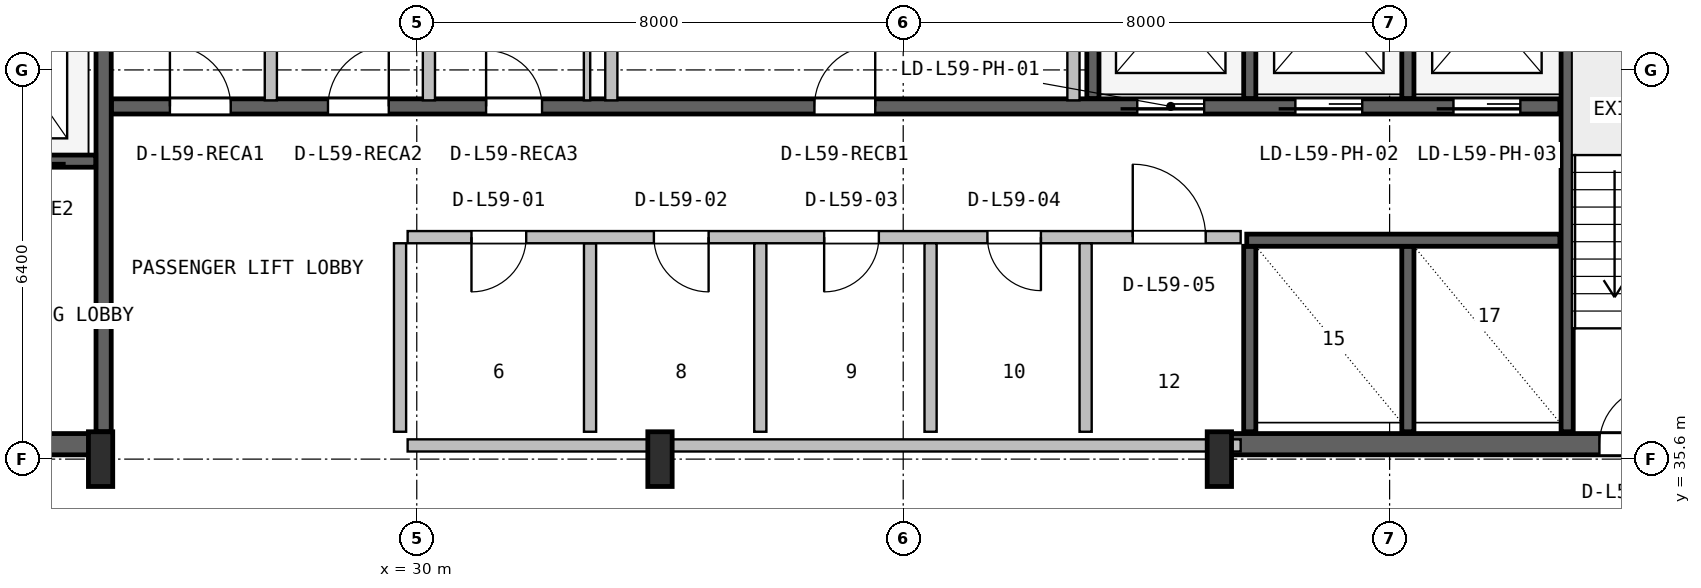
"""IFC4 building model, lengths in metres.
Left out: names, types, materials, properties, quantities, classifications, styles, units other than length and angle.
Written with IfcOpenShell. Run it as: python <this file> out.ifc"""

import sys

from ifc_helpers import new_model, si_unit, direction, frame, frame_2d, origin, origin_2d, place, context, subcontext, project, spatial, rectangle, i_section, extrude, source, transform, mapped, element, fill, save


model = new_model("IFC4")
c1 = context("Model", 3, precision=1e-05, world=origin(), true_north=direction((0.0, 1.0)))
c2 = subcontext(c1, "Body", "Model", "MODEL_VIEW")
j1 = project(units=[si_unit("LENGTHUNIT", "METRE"), si_unit("PLANEANGLEUNIT", "RADIAN")], contexts=[c1])
p1 = place(None, origin())
s1 = spatial("IfcSite", under=j1, at=p1, CompositionType="ELEMENT")
p2 = place(p1, origin())
s2 = spatial("IfcBuilding", under=s1, at=p2, CompositionType="ELEMENT")
p3 = place(p2, frame((0.0, 0.0, 239.4)))
s3 = spatial("IfcBuildingStorey", under=s2, at=p3, CompositionType="ELEMENT", Elevation=239.4)
p4 = place(p3, frame((15.67, 35.845, 0.0), z_axis=(0.0, 0.0, 1.0), x_axis=(1.0, 0.0, 0.0)))
e1 = element("IfcWall", 1, at=p4, inside=s3, PredefinedType="SHEAR", context=c2, shape_type="SweptSolid", body=[
    extrude(rectangle(XDim=9.13, YDim=0.35, at=frame_2d((4.565, 0.0))), origin(), (0.0, 0.0, 1.0), 3.55),
])
p5 = place(p4, frame((5.4, 0.0, 0.0)))
e2 = element("IfcOpeningElement", 2, at=p5, cuts=e1, PredefinedType="OPENING", context=c2, shape_type="SweptSolid", body=[
    extrude(rectangle(XDim=1.0, YDim=2.1, at=frame_2d((0.5, 1.05))), frame((0.0, 0.185, 0.0), z_axis=(0.0, -1.0, 0.0), x_axis=(1.0, 0.0, 0.0)), (0.0, 0.0, 1.0), 0.37),
])
p6 = place(p3, frame((43.2, 35.845, 0.0), z_axis=(0.0, 0.0, 1.0), x_axis=(1.0, 0.0, 0.0)))
e3 = element("IfcWall", 3, at=p6, inside=s3, PredefinedType="SHEAR", context=c2, shape_type="SweptSolid", body=[
    extrude(rectangle(XDim=9.13, YDim=0.35, at=frame_2d((4.565, 0.0))), origin(), (0.0, 0.0, 1.0), 3.55),
])
p7 = place(p6, frame((6.25, 0.0, 0.0)))
e4 = element("IfcOpeningElement", 4, at=p7, cuts=e3, PredefinedType="OPENING", context=c2, shape_type="SweptSolid", body=[
    extrude(rectangle(XDim=0.95, YDim=2.1, at=frame_2d((0.475, 1.05))), frame((0.0, 0.185, 0.0), z_axis=(0.0, -1.0, 0.0), x_axis=(1.0, 0.0, 0.0)), (0.0, 0.0, 1.0), 0.37),
])
m1 = source(origin(), c2, "Body", "SweptSolid", [
    extrude(i_section(OverallWidth=0.4, OverallDepth=0.9, WebThickness=0.016, FlangeThickness=0.028, FilletRadius=0.016, at=origin_2d()), origin(), (0.0, 0.0, 1.0), 3.8),
])
for number, where, z_axis, x_axis in (
    (5, (24.8, 35.6, 0.0), (0.0, 0.0, 1.0), (1.0, 0.0, 0.0)),
    (6, (34.0, 35.6, 0.0), (0.0, 0.0, 1.0), (1.0, 0.0, 0.0)),
    (7, (43.2, 35.6, 0.0), (0.0, 0.0, 1.0), (1.0, 0.0, 0.0)),
):
    element("IfcColumn", number, at=place(p3, frame(where, z_axis=z_axis, x_axis=x_axis)), inside=s3, PredefinedType="COLUMN", context=c2, shape_type="MappedRepresentation", body=[
        mapped(m1, transform((0.0, 0.0, 0.0), x_axis=(1.0, 0.0, 0.0), y_axis=(0.0, 1.0, 0.0), z_axis=(0.0, 0.0, 1.0), scale=1.0)),
    ])
p8 = place(p3, frame((24.85, 36.05, 0.0), z_axis=(0.0, 0.0, 1.0), x_axis=(0.0, 1.0, 0.0)))
e8 = element("IfcWall", 8, at=p8, inside=s3, PredefinedType="SHEAR", context=c2, shape_type="SweptSolid", body=[
    extrude(rectangle(XDim=10.45, YDim=0.25, at=frame_2d((5.225, 0.0))), origin(), (0.0, 0.0, 1.0), 3.55),
])
p9 = place(p3, frame((19.2, 40.5, 0.0), z_axis=(0.0, 0.0, 1.0), x_axis=(1.0, 0.0, 0.0)))
e9 = element("IfcWall", 9, at=p9, inside=s3, PredefinedType="SHEAR", context=c2, shape_type="SweptSolid", body=[
    extrude(rectangle(XDim=5.52, YDim=0.2, at=frame_2d((2.76, 0.0))), origin(), (0.0, 0.0, 1.0), 3.55),
])
p10 = place(p9, frame((1.05, 0.0, 0.0)))
e10 = element("IfcOpeningElement", 10, at=p10, cuts=e9, PredefinedType="OPENING", context=c2, shape_type="SweptSolid", body=[
    extrude(rectangle(XDim=1.1, YDim=2.18, at=frame_2d((0.55, 1.09))), frame((0.0, 0.11, 0.0), z_axis=(0.0, -1.0, 0.0), x_axis=(1.0, 0.0, 0.0)), (0.0, 0.0, 1.0), 0.22),
])
p11 = place(p9, frame((3.65, 0.0, 0.0)))
e11 = element("IfcOpeningElement", 11, at=p11, cuts=e9, PredefinedType="OPENING", context=c2, shape_type="SweptSolid", body=[
    extrude(rectangle(XDim=1.1, YDim=2.18, at=frame_2d((0.55, 1.09))), frame((0.0, 0.11, 0.0), z_axis=(0.0, -1.0, 0.0), x_axis=(1.0, 0.0, 0.0)), (0.0, 0.0, 1.0), 0.22),
])
p12 = place(p3, frame((48.92, 36.05, 0.0), z_axis=(0.0, 0.0, 1.0), x_axis=(0.0, 1.0, 0.0)))
e12 = element("IfcWall", 12, at=p12, inside=s3, PredefinedType="SHEAR", context=c2, shape_type="SweptSolid", body=[
    extrude(rectangle(XDim=10.5, YDim=0.2, at=frame_2d((5.25, 0.0))), origin(), (0.0, 0.0, 1.0), 3.55),
])
p13 = place(p3, frame((24.98, 41.4, 0.0), z_axis=(0.0, 0.0, 1.0), x_axis=(1.0, 0.0, 0.0)))
e13 = element("IfcWall", 13, at=p13, inside=s3, PredefinedType="SHEAR", context=c2, shape_type="SweptSolid", body=[
    extrude(rectangle(XDim=23.82, YDim=0.25, at=frame_2d((11.91, 0.0))), origin(), (0.0, 0.0, 1.0), 3.55),
])
p14 = place(p13, frame((16.87, 0.0, 0.0)))
e14 = element("IfcOpeningElement", 14, at=p14, cuts=e13, PredefinedType="OPENING", context=c2, shape_type="SweptSolid", body=[
    extrude(rectangle(XDim=1.1, YDim=2.18, at=frame_2d((0.55, 1.09))), frame((0.0, 0.135, 0.0), z_axis=(0.0, -1.0, 0.0), x_axis=(1.0, 0.0, 0.0)), (0.0, 0.0, 1.0), 0.27),
])
p15 = place(p13, frame((19.47, 0.0, 0.0)))
e15 = element("IfcOpeningElement", 15, at=p15, cuts=e13, PredefinedType="OPENING", context=c2, shape_type="SweptSolid", body=[
    extrude(rectangle(XDim=1.1, YDim=2.18, at=frame_2d((0.55, 1.09))), frame((0.0, 0.135, 0.0), z_axis=(0.0, -1.0, 0.0), x_axis=(1.0, 0.0, 0.0)), (0.0, 0.0, 1.0), 0.27),
])
p16 = place(p13, frame((22.07, 0.0, 0.0)))
e16 = element("IfcOpeningElement", 16, at=p16, cuts=e13, PredefinedType="OPENING", context=c2, shape_type="SweptSolid", body=[
    extrude(rectangle(XDim=1.1, YDim=2.18, at=frame_2d((0.55, 1.09))), frame((0.0, 0.135, 0.0), z_axis=(0.0, -1.0, 0.0), x_axis=(1.0, 0.0, 0.0)), (0.0, 0.0, 1.0), 0.27),
])
p17 = place(p13, frame((0.96, 0.0, 0.0)))
e17 = element("IfcOpeningElement", 17, at=p17, cuts=e13, PredefinedType="OPENING", context=c2, shape_type="SweptSolid", body=[
    extrude(rectangle(XDim=1.0, YDim=2.08, at=frame_2d((0.5, 1.04))), frame((0.0, 0.135, 0.0), z_axis=(0.0, -1.0, 0.0), x_axis=(1.0, 0.0, 0.0)), (0.0, 0.0, 1.0), 0.27),
])
p18 = place(p13, frame((3.56, 0.0, 0.0)))
e18 = element("IfcOpeningElement", 18, at=p18, cuts=e13, PredefinedType="OPENING", context=c2, shape_type="SweptSolid", body=[
    extrude(rectangle(XDim=1.0, YDim=2.08, at=frame_2d((0.5, 1.04))), frame((0.0, 0.135, 0.0), z_axis=(0.0, -1.0, 0.0), x_axis=(1.0, 0.0, 0.0)), (0.0, 0.0, 1.0), 0.27),
])
p19 = place(p13, frame((6.16, 0.0, 0.0)))
e19 = element("IfcOpeningElement", 19, at=p19, cuts=e13, PredefinedType="OPENING", context=c2, shape_type="SweptSolid", body=[
    extrude(rectangle(XDim=0.92, YDim=2.08, at=frame_2d((0.46, 1.04))), frame((0.0, 0.135, 0.0), z_axis=(0.0, -1.0, 0.0), x_axis=(1.0, 0.0, 0.0)), (0.0, 0.0, 1.0), 0.27),
])
p20 = place(p13, frame((11.56, 0.0, 0.0)))
e20 = element("IfcOpeningElement", 20, at=p20, cuts=e13, PredefinedType="OPENING", context=c2, shape_type="SweptSolid", body=[
    extrude(rectangle(XDim=1.0, YDim=2.08, at=frame_2d((0.5, 1.04))), frame((0.0, 0.135, 0.0), z_axis=(0.0, -1.0, 0.0), x_axis=(1.0, 0.0, 0.0)), (0.0, 0.0, 1.0), 0.27),
])
p21 = place(p3, frame((41.12, 41.53, 0.0), z_axis=(0.0, 0.0, 1.0), x_axis=(0.0, 1.0, 0.0)))
e21 = element("IfcWall", 21, at=p21, inside=s3, PredefinedType="SHEAR", context=c2, shape_type="SweptSolid", body=[
    extrude(rectangle(XDim=5.02, YDim=0.2, at=frame_2d((2.51, 0.0))), origin(), (0.0, 0.0, 1.0), 3.55),
])
for number, where, z_axis, x_axis in (
    (22, (43.7, 41.53, 0.0), (0.0, 0.0, 1.0), (0.0, 1.0, 0.0)),
    (23, (46.3, 41.53, 0.0), (0.0, 0.0, 1.0), (0.0, 1.0, 0.0)),
):
    element("IfcWall", number, at=place(p3, frame(where, z_axis=z_axis, x_axis=x_axis)), inside=s3, PredefinedType="SHEAR", context=c2, shape_type="SweptSolid", body=[
        extrude(rectangle(XDim=2.87, YDim=0.2, at=frame_2d((1.435, 0.0))), origin(), (0.0, 0.0, 1.0), 3.55),
    ])
for number, where, z_axis, x_axis in (
    (24, (43.7, 36.05, 0.0), (0.0, 0.0, 1.0), (0.0, 1.0, 0.0)),
    (25, (46.3, 36.05, 0.0), (0.0, 0.0, 1.0), (0.0, 1.0, 0.0)),
):
    element("IfcWall", number, at=place(p3, frame(where, z_axis=z_axis, x_axis=x_axis)), inside=s3, PredefinedType="SHEAR", context=c2, shape_type="SweptSolid", body=[
        extrude(rectangle(XDim=3.05, YDim=0.2, at=frame_2d((1.525, 0.0))), origin(), (0.0, 0.0, 1.0), 3.55),
    ])
p22 = place(p3, frame((43.65, 39.2, 0.0), z_axis=(0.0, 0.0, 1.0), x_axis=(1.0, 0.0, 0.0)))
e26 = element("IfcWall", 26, at=p22, inside=s3, PredefinedType="SHEAR", context=c2, shape_type="SweptSolid", body=[
    extrude(rectangle(XDim=5.15, YDim=0.2, at=frame_2d((2.575, 0.0))), origin(), (0.0, 0.0, 1.0), 3.55),
])
p23 = place(p3, frame((29.85, 35.825, 0.0), z_axis=(0.0, 0.0, 1.0), x_axis=(1.0, 0.0, 0.0)))
e27 = element("IfcWall", 27, at=p23, inside=s3, PredefinedType="SOLIDWALL", context=c2, shape_type="SweptSolid", body=[
    extrude(rectangle(XDim=13.7, YDim=0.2, at=frame_2d((6.85, 0.0))), origin(), (0.0, 0.0, 1.0), 2.575),
])
p24 = place(p3, frame((32.85, 36.05, 0.0), z_axis=(0.0, 0.0, 1.0), x_axis=(0.0, 1.0, 0.0)))
e28 = element("IfcWall", 28, at=p24, inside=s3, PredefinedType="PLUMBINGWALL", context=c2, shape_type="SweptSolid", body=[
    extrude(rectangle(XDim=3.1, YDim=0.2, at=frame_2d((1.55, 0.0))), origin(), (0.0, 0.0, 1.0), 3.53),
])
p25 = place(p3, frame((29.85, 39.25, 0.0), z_axis=(0.0, 0.0, 1.0), x_axis=(1.0, 0.0, 0.0)))
e29 = element("IfcWall", 29, at=p25, inside=s3, PredefinedType="SOLIDWALL", context=c2, shape_type="SweptSolid", body=[
    extrude(rectangle(XDim=13.7, YDim=0.2, at=frame_2d((6.85, 0.0))), origin(), (0.0, 0.0, 1.0), 3.53),
])
p26 = place(p25, frame((1.05, 0.0, 0.0)))
e30 = element("IfcOpeningElement", 30, at=p26, cuts=e29, PredefinedType="OPENING", context=c2, shape_type="SweptSolid", body=[
    extrude(rectangle(XDim=0.9, YDim=2.06, at=frame_2d((0.45, 1.03))), frame((0.0, 0.11, 0.0), z_axis=(0.0, -1.0, 0.0), x_axis=(1.0, 0.0, 0.0)), (0.0, 0.0, 1.0), 0.22),
])
p27 = place(p25, frame((4.05, 0.0, 0.0)))
e31 = element("IfcOpeningElement", 31, at=p27, cuts=e29, PredefinedType="OPENING", context=c2, shape_type="SweptSolid", body=[
    extrude(rectangle(XDim=0.9, YDim=2.06, at=frame_2d((0.45, 1.03))), frame((0.0, 0.11, 0.0), z_axis=(0.0, -1.0, 0.0), x_axis=(1.0, 0.0, 0.0)), (0.0, 0.0, 1.0), 0.22),
])
p28 = place(p25, frame((6.85, 0.0, 0.0)))
e32 = element("IfcOpeningElement", 32, at=p28, cuts=e29, PredefinedType="OPENING", context=c2, shape_type="SweptSolid", body=[
    extrude(rectangle(XDim=0.9, YDim=2.06, at=frame_2d((0.45, 1.03))), frame((0.0, 0.11, 0.0), z_axis=(0.0, -1.0, 0.0), x_axis=(1.0, 0.0, 0.0)), (0.0, 0.0, 1.0), 0.22),
])
p29 = place(p25, frame((9.535, 0.0, 0.0)))
e33 = element("IfcOpeningElement", 33, at=p29, cuts=e29, PredefinedType="OPENING", context=c2, shape_type="SweptSolid", body=[
    extrude(rectangle(XDim=0.88, YDim=2.06, at=frame_2d((0.44, 1.03))), frame((0.0, 0.11, 0.0), z_axis=(0.0, -1.0, 0.0), x_axis=(1.0, 0.0, 0.0)), (0.0, 0.0, 1.0), 0.22),
])
p30 = place(p25, frame((11.925, 0.0, 0.0)))
e34 = element("IfcOpeningElement", 34, at=p30, cuts=e29, PredefinedType="OPENING", context=c2, shape_type="SweptSolid", body=[
    extrude(rectangle(XDim=1.2, YDim=2.1, at=frame_2d((0.6, 1.05))), frame((0.0, 0.11, 0.0), z_axis=(0.0, -1.0, 0.0), x_axis=(1.0, 0.0, 0.0)), (0.0, 0.0, 1.0), 0.22),
])
for number, where, z_axis, x_axis in (
    (35, (29.725, 36.05, 0.0), (0.0, 0.0, 1.0), (0.0, 1.0, 0.0)),
    (36, (35.65, 36.05, 0.0), (0.0, 0.0, 1.0), (0.0, 1.0, 0.0)),
    (37, (38.45, 36.05, 0.0), (0.0, 0.0, 1.0), (0.0, 1.0, 0.0)),
):
    element("IfcWall", number, at=place(p3, frame(where, z_axis=z_axis, x_axis=x_axis)), inside=s3, PredefinedType="PLUMBINGWALL", context=c2, shape_type="SweptSolid", body=[
        extrude(rectangle(XDim=3.1, YDim=0.2, at=frame_2d((1.55, 0.0))), origin(), (0.0, 0.0, 1.0), 3.53),
    ])
p31 = place(p3, frame((41.0, 36.05, 0.0), z_axis=(0.0, 0.0, 1.0), x_axis=(0.0, 1.0, 0.0)))
e38 = element("IfcWall", 38, at=p31, inside=s3, PredefinedType="SOLIDWALL", context=c2, shape_type="SweptSolid", body=[
    extrude(rectangle(XDim=3.1, YDim=0.2, at=frame_2d((1.55, 0.0))), origin(), (0.0, 0.0, 1.0), 3.53),
])
for number, where, z_axis, x_axis in (
    (39, (27.6, 41.5, 0.0), (0.0, 0.0, 1.0), (0.0, 1.0, 0.0)),
    (40, (30.2, 41.5, 0.0), (0.0, 0.0, 1.0), (0.0, 1.0, 0.0)),
):
    element("IfcWall", number, at=place(p3, frame(where, z_axis=z_axis, x_axis=x_axis)), inside=s3, PredefinedType="SOLIDWALL", context=c2, shape_type="SweptSolid", body=[
        extrude(rectangle(XDim=5.02, YDim=0.2, at=frame_2d((2.51, 0.0))), origin(), (0.0, 0.0, 1.0), 3.53),
    ])
p32 = place(p3, frame((32.8, 41.5, 0.0), z_axis=(0.0, 0.0, 1.0), x_axis=(0.0, 1.0, 0.0)))
e41 = element("IfcWall", 41, at=p32, inside=s3, PredefinedType="PARTITIONING", context=c2, shape_type="SweptSolid", body=[
    extrude(rectangle(XDim=5.02, YDim=0.105, at=frame_2d((2.51, 0.0))), origin(), (0.0, 0.0, 1.0), 3.53),
])
for number, where, z_axis, x_axis in (
    (42, (40.8, 41.5, 0.0), (0.0, 0.0, 1.0), (0.0, 1.0, 0.0)),
    (43, (33.2, 41.5, 0.0), (0.0, 0.0, 1.0), (0.0, 1.0, 0.0)),
):
    element("IfcWall", number, at=place(p3, frame(where, z_axis=z_axis, x_axis=x_axis)), inside=s3, PredefinedType="SOLIDWALL", context=c2, shape_type="SweptSolid", body=[
        extrude(rectangle(XDim=5.02, YDim=0.2, at=frame_2d((2.51, 0.0))), origin(), (0.0, 0.0, 1.0), 3.53),
    ])
m2 = source(origin(), c2, "Body", "SweptSolid", [
    extrude(rectangle(XDim=0.95, YDim=2.1, at=frame_2d((0.475, 1.05))), frame((0.0, 0.025, 0.0), z_axis=(0.0, -1.0, 0.0), x_axis=(1.0, 0.0, 0.0)), (0.0, 0.0, 1.0), 0.05),
])
p33 = place(p7, origin())
e44 = element("IfcDoor", 44, at=p33, inside=s3, OperationType="SINGLE_SWING_RIGHT", PredefinedType="DOOR", context=c2, shape_type="MappedRepresentation", body=[
    mapped(m2, transform((0.0, 0.0, 0.0), x_axis=(1.0, 0.0, 0.0), y_axis=(0.0, 1.0, 0.0), z_axis=(0.0, 0.0, 1.0), scale=1.0)),
])
fill(e4, e44)
m3 = source(origin(), c2, "Body", "SweptSolid", [
    extrude(rectangle(XDim=1.1, YDim=2.18, at=frame_2d((0.55, 1.09))), frame((0.0, 0.025, 0.0), z_axis=(0.0, -1.0, 0.0), x_axis=(1.0, 0.0, 0.0)), (0.0, 0.0, 1.0), 0.05),
])
p34 = place(p14, frame((1.1, 0.0, 0.0), z_axis=(0.0, 0.0, 1.0), x_axis=(-1.0, 0.0, 0.0)))
e45 = element("IfcDoor", 45, at=p34, inside=s3, OperationType="SLIDING_TO_LEFT", PredefinedType="DOOR", context=c2, shape_type="MappedRepresentation", body=[
    mapped(m3, transform((0.0, 0.0, 0.0), x_axis=(1.0, 0.0, 0.0), y_axis=(0.0, 1.0, 0.0), z_axis=(0.0, 0.0, 1.0), scale=1.0)),
])
fill(e14, e45)
p35 = place(p15, frame((1.1, 0.0, 0.0), z_axis=(0.0, 0.0, 1.0), x_axis=(-1.0, 0.0, 0.0)))
e46 = element("IfcDoor", 46, at=p35, inside=s3, OperationType="SLIDING_TO_LEFT", PredefinedType="DOOR", context=c2, shape_type="MappedRepresentation", body=[
    mapped(m3, transform((0.0, 0.0, 0.0), x_axis=(1.0, 0.0, 0.0), y_axis=(0.0, 1.0, 0.0), z_axis=(0.0, 0.0, 1.0), scale=1.0)),
])
fill(e15, e46)
p36 = place(p16, frame((1.1, 0.0, 0.0), z_axis=(0.0, 0.0, 1.0), x_axis=(-1.0, 0.0, 0.0)))
e47 = element("IfcDoor", 47, at=p36, inside=s3, OperationType="SLIDING_TO_LEFT", PredefinedType="DOOR", context=c2, shape_type="MappedRepresentation", body=[
    mapped(m3, transform((0.0, 0.0, 0.0), x_axis=(1.0, 0.0, 0.0), y_axis=(0.0, 1.0, 0.0), z_axis=(0.0, 0.0, 1.0), scale=1.0)),
])
fill(e16, e47)
m4 = source(origin(), c2, "Body", "SweptSolid", [
    extrude(rectangle(XDim=1.0, YDim=2.08, at=frame_2d((0.5, 1.04))), frame((0.0, 0.025, 0.0), z_axis=(0.0, -1.0, 0.0), x_axis=(1.0, 0.0, 0.0)), (0.0, 0.0, 1.0), 0.05),
])
p37 = place(p17, origin())
e48 = element("IfcDoor", 48, at=p37, inside=s3, OperationType="SINGLE_SWING_LEFT", PredefinedType="DOOR", context=c2, shape_type="MappedRepresentation", body=[
    mapped(m4, transform((0.0, 0.0, 0.0), x_axis=(1.0, 0.0, 0.0), y_axis=(0.0, 1.0, 0.0), z_axis=(0.0, 0.0, 1.0), scale=1.0)),
])
fill(e17, e48)
p38 = place(p18, origin())
e49 = element("IfcDoor", 49, at=p38, inside=s3, OperationType="SINGLE_SWING_RIGHT", PredefinedType="DOOR", context=c2, shape_type="MappedRepresentation", body=[
    mapped(m4, transform((0.0, 0.0, 0.0), x_axis=(1.0, 0.0, 0.0), y_axis=(0.0, 1.0, 0.0), z_axis=(0.0, 0.0, 1.0), scale=1.0)),
])
fill(e18, e49)
m5 = source(origin(), c2, "Body", "SweptSolid", [
    extrude(rectangle(XDim=0.92, YDim=2.08, at=frame_2d((0.46, 1.04))), frame((0.0, 0.025, 0.0), z_axis=(0.0, -1.0, 0.0), x_axis=(1.0, 0.0, 0.0)), (0.0, 0.0, 1.0), 0.05),
])
p39 = place(p19, origin())
e50 = element("IfcDoor", 50, at=p39, inside=s3, OperationType="SINGLE_SWING_LEFT", PredefinedType="DOOR", context=c2, shape_type="MappedRepresentation", body=[
    mapped(m5, transform((0.0, 0.0, 0.0), x_axis=(1.0, 0.0, 0.0), y_axis=(0.0, 1.0, 0.0), z_axis=(0.0, 0.0, 1.0), scale=1.0)),
])
fill(e19, e50)
p40 = place(p20, origin())
e51 = element("IfcDoor", 51, at=p40, inside=s3, OperationType="SINGLE_SWING_RIGHT", PredefinedType="DOOR", context=c2, shape_type="MappedRepresentation", body=[
    mapped(m4, transform((0.0, 0.0, 0.0), x_axis=(1.0, 0.0, 0.0), y_axis=(0.0, 1.0, 0.0), z_axis=(0.0, 0.0, 1.0), scale=1.0)),
])
fill(e20, e51)
m6 = source(origin(), c2, "Body", "SweptSolid", [
    extrude(rectangle(XDim=0.9, YDim=2.06, at=frame_2d((0.45, 1.03))), frame((0.0, 0.025, 0.0), z_axis=(0.0, -1.0, 0.0), x_axis=(1.0, 0.0, 0.0)), (0.0, 0.0, 1.0), 0.05),
])
p41 = place(p26, frame((0.9, 0.0, 0.0), z_axis=(0.0, 0.0, 1.0), x_axis=(-1.0, 0.0, 0.0)))
e52 = element("IfcDoor", 52, at=p41, inside=s3, OperationType="SINGLE_SWING_LEFT", PredefinedType="DOOR", context=c2, shape_type="MappedRepresentation", body=[
    mapped(m6, transform((0.0, 0.0, 0.0), x_axis=(1.0, 0.0, 0.0), y_axis=(0.0, 1.0, 0.0), z_axis=(0.0, 0.0, 1.0), scale=1.0)),
])
fill(e30, e52)
p42 = place(p27, frame((0.9, 0.0, 0.0), z_axis=(0.0, 0.0, 1.0), x_axis=(-1.0, 0.0, 0.0)))
e53 = element("IfcDoor", 53, at=p42, inside=s3, OperationType="SINGLE_SWING_RIGHT", PredefinedType="DOOR", context=c2, shape_type="MappedRepresentation", body=[
    mapped(m6, transform((0.0, 0.0, 0.0), x_axis=(1.0, 0.0, 0.0), y_axis=(0.0, 1.0, 0.0), z_axis=(0.0, 0.0, 1.0), scale=1.0)),
])
fill(e31, e53)
p43 = place(p28, frame((0.9, 0.0, 0.0), z_axis=(0.0, 0.0, 1.0), x_axis=(-1.0, 0.0, 0.0)))
e54 = element("IfcDoor", 54, at=p43, inside=s3, OperationType="SINGLE_SWING_LEFT", PredefinedType="DOOR", context=c2, shape_type="MappedRepresentation", body=[
    mapped(m6, transform((0.0, 0.0, 0.0), x_axis=(1.0, 0.0, 0.0), y_axis=(0.0, 1.0, 0.0), z_axis=(0.0, 0.0, 1.0), scale=1.0)),
])
fill(e32, e54)
m7 = source(origin(), c2, "Body", "SweptSolid", [
    extrude(rectangle(XDim=0.88, YDim=2.06, at=frame_2d((0.44, 1.03))), frame((0.0, 0.025, 0.0), z_axis=(0.0, -1.0, 0.0), x_axis=(1.0, 0.0, 0.0)), (0.0, 0.0, 1.0), 0.05),
])
p44 = place(p29, frame((0.88, 0.0, 0.0), z_axis=(0.0, 0.0, 1.0), x_axis=(-1.0, 0.0, 0.0)))
e55 = element("IfcDoor", 55, at=p44, inside=s3, OperationType="SINGLE_SWING_RIGHT", PredefinedType="DOOR", context=c2, shape_type="MappedRepresentation", body=[
    mapped(m7, transform((0.0, 0.0, 0.0), x_axis=(1.0, 0.0, 0.0), y_axis=(0.0, 1.0, 0.0), z_axis=(0.0, 0.0, 1.0), scale=1.0)),
])
fill(e33, e55)
m8 = source(origin(), c2, "Body", "SweptSolid", [
    extrude(rectangle(XDim=1.2, YDim=2.1, at=frame_2d((0.6, 1.05))), frame((0.0, 0.025, 0.0), z_axis=(0.0, -1.0, 0.0), x_axis=(1.0, 0.0, 0.0)), (0.0, 0.0, 1.0), 0.05),
])
p45 = place(p30, origin())
e56 = element("IfcDoor", 56, at=p45, inside=s3, OperationType="SINGLE_SWING_LEFT", PredefinedType="DOOR", context=c2, shape_type="MappedRepresentation", body=[
    mapped(m8, transform((0.0, 0.0, 0.0), x_axis=(1.0, 0.0, 0.0), y_axis=(0.0, 1.0, 0.0), z_axis=(0.0, 0.0, 1.0), scale=1.0)),
])
fill(e34, e56)
save(model, sys.argv[1])
